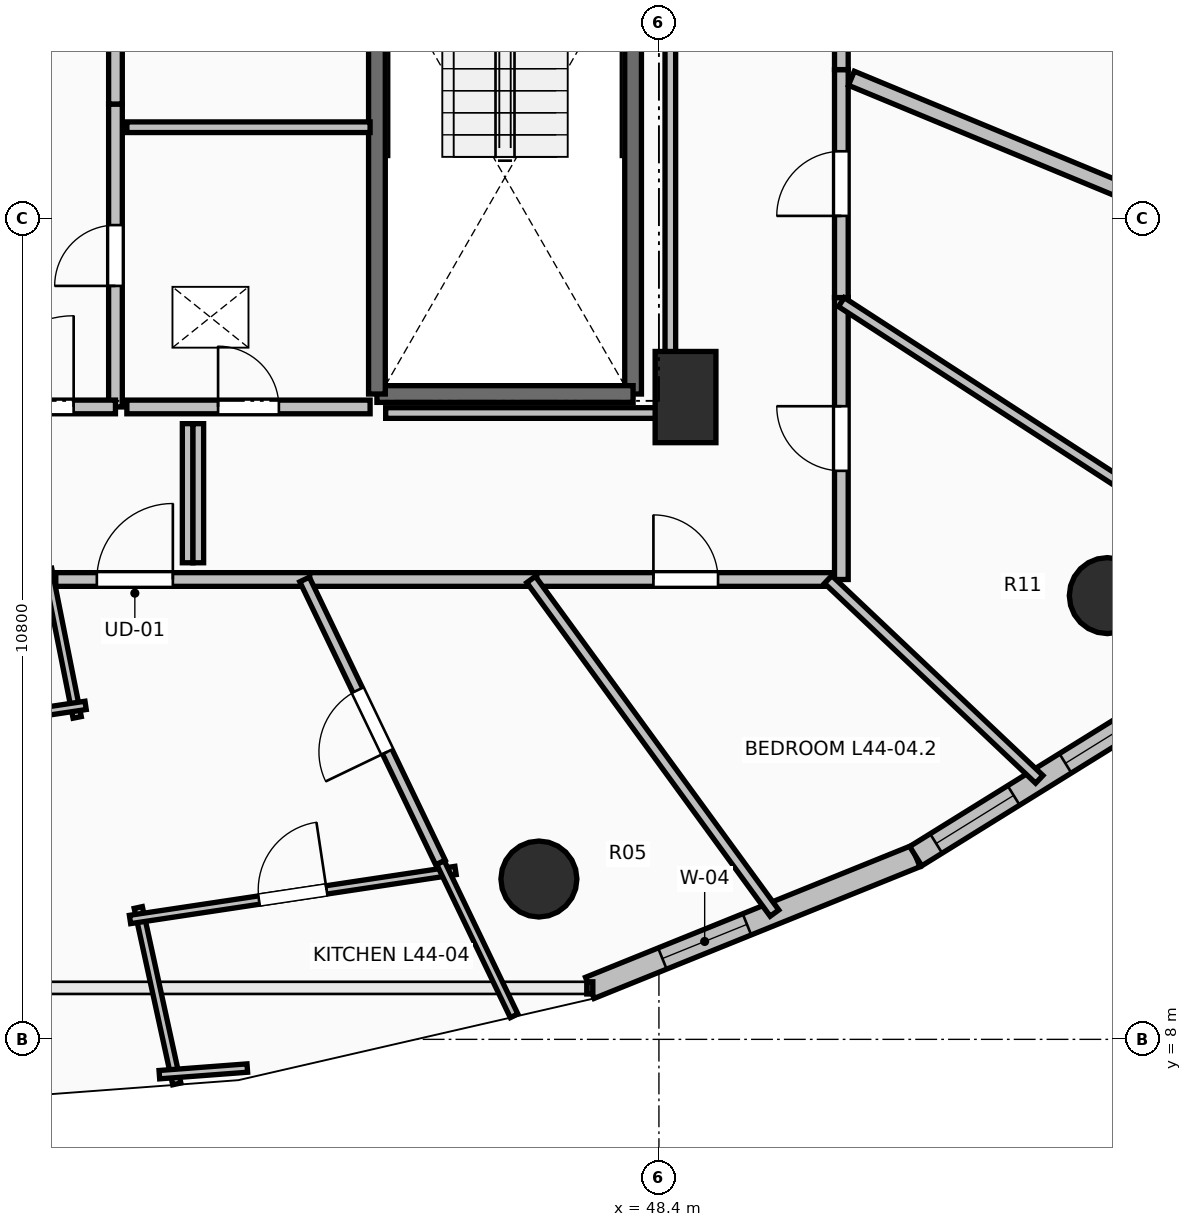
"""IFC4 building model, lengths in metres.
Left out: names, types, materials, properties, quantities, classifications, styles, units other than length and angle.
Written with IfcOpenShell. Run it as: python <this file> out.ifc"""

import sys

from ifc_helpers import new_model, si_unit, direction, frame, frame_2d, origin, origin_2d, place, context, subcontext, project, spatial, rectangle, circle, extrude, element, fill, save


model = new_model("IFC4")
c1 = context("Model", 3, precision=1e-05, world=origin(), true_north=direction((0.0, 1.0)))
c2 = subcontext(c1, "Body", "Model", "MODEL_VIEW")
j1 = project(units=[si_unit("LENGTHUNIT", "METRE"), si_unit("PLANEANGLEUNIT", "RADIAN")], contexts=[c1])
p1 = place(None, origin())
s1 = spatial("IfcSite", under=j1, at=p1, CompositionType="ELEMENT")
p2 = place(p1, origin())
s2 = spatial("IfcBuilding", under=s1, at=p2, CompositionType="ELEMENT")
p3 = place(p2, frame((0.0, 0.0, 164.1)))
s3 = spatial("IfcBuildingStorey", under=s2, at=p3, CompositionType="ELEMENT", Elevation=164.1)
for number, where, z_axis, x_axis in (
    (1, (46.821, 10.109, 0.0), (0.0, 0.0, 1.0), (0.383, -0.924, 0.0)),
    (2, (54.299, 13.838, 0.0), (0.0, 0.0, 1.0), (0.707, -0.707, 0.0)),
):
    element("IfcColumn", number, at=place(p3, frame(where, z_axis=z_axis, x_axis=x_axis)), inside=s3, PredefinedType="COLUMN", context=c2, shape_type="SweptSolid", body=[
        extrude(circle(Radius=0.5, at=origin_2d()), origin(), (0.0, 0.0, 1.0), 3.5),
    ])
p4 = place(p3, frame((48.75, 16.45, 0.0), z_axis=(0.0, 0.0, 1.0), x_axis=(1.0, 0.0, 0.0)))
e3 = element("IfcColumn", 3, at=p4, inside=s3, PredefinedType="PILASTER", context=c2, shape_type="SweptSolid", body=[
    extrude(rectangle(XDim=0.8, YDim=1.2, at=origin_2d()), origin(), (0.0, 0.0, 1.0), 3.5),
])
p5 = place(p3, frame((47.49, 8.677, 0.0), z_axis=(0.0, 0.0, 1.0), x_axis=(0.927156504392, 0.374674280359, 0.0)))
e4 = element("IfcWall", 4, at=p5, inside=s3, PredefinedType="STANDARD", context=c2, shape_type="SweptSolid", body=[
    extrude(rectangle(XDim=4.625, YDim=0.3, at=frame_2d((2.312, 0.0))), origin(), (0.0, 0.0, 1.0), 3.24),
])
p6 = place(p5, frame((1.03, 0.0, 0.85)))
e5 = element("IfcOpeningElement", 5, at=p6, cuts=e4, PredefinedType="OPENING", context=c2, shape_type="SweptSolid", body=[
    extrude(rectangle(XDim=1.2, YDim=1.95, at=frame_2d((0.6, 0.975))), frame((0.0, 0.165, 0.0), z_axis=(0.0, -1.0, 0.0), x_axis=(1.0, 0.0, 0.0)), (0.0, 0.0, 1.0), 0.33),
])
p7 = place(p3, frame((51.778, 10.41, 0.0), z_axis=(0.0, 0.0, 1.0), x_axis=(0.849721181976, 0.527232313977, 0.0)))
e6 = element("IfcWall", 6, at=p7, inside=s3, PredefinedType="STANDARD", context=c2, shape_type="SweptSolid", body=[
    extrude(rectangle(XDim=4.423, YDim=0.3, at=frame_2d((2.211, 0.0))), origin(), (0.0, 0.0, 1.0), 3.24),
])
p8 = place(p7, frame((0.317, 0.0, 0.85)))
e7 = element("IfcOpeningElement", 7, at=p8, cuts=e6, PredefinedType="OPENING", context=c2, shape_type="SweptSolid", body=[
    extrude(rectangle(XDim=1.2, YDim=1.95, at=frame_2d((0.6, 0.975))), frame((0.0, 0.165, 0.0), z_axis=(0.0, -1.0, 0.0), x_axis=(1.0, 0.0, 0.0)), (0.0, 0.0, 1.0), 0.33),
])
p9 = place(p7, frame((2.318, 0.0, 0.85)))
e8 = element("IfcOpeningElement", 8, at=p9, cuts=e6, PredefinedType="OPENING", context=c2, shape_type="SweptSolid", body=[
    extrude(rectangle(XDim=1.2, YDim=1.95, at=frame_2d((0.6, 0.975))), frame((0.0, 0.165, 0.0), z_axis=(0.0, -1.0, 0.0), x_axis=(1.0, 0.0, 0.0)), (0.0, 0.0, 1.0), 0.33),
])
p10 = place(p3, frame((48.06, 23.91, 0.0), z_axis=(0.0, 0.0, 1.0), x_axis=(0.0, -1.0, 0.0)))
e9 = element("IfcWall", 9, at=p10, inside=s3, PredefinedType="SOLIDWALL", context=c2, shape_type="SweptSolid", body=[
    extrude(rectangle(XDim=7.42, YDim=0.22, at=frame_2d((3.71, 0.0))), origin(), (0.0, 0.0, 1.0), 3.24),
])
p11 = place(p3, frame((48.06, 16.49, 0.0), z_axis=(0.0, 0.0, 1.0), x_axis=(-1.0, 0.0, 0.0)))
e10 = element("IfcWall", 10, at=p11, inside=s3, PredefinedType="SOLIDWALL", context=c2, shape_type="SweptSolid", body=[
    extrude(rectangle(XDim=3.37, YDim=0.22, at=frame_2d((1.685, 0.0))), origin(), (0.0, 0.0, 1.0), 3.24),
])
p12 = place(p3, frame((44.69, 16.49, 0.0), z_axis=(0.0, 0.0, 1.0), x_axis=(0.0, 1.0, 0.0)))
e11 = element("IfcWall", 11, at=p12, inside=s3, PredefinedType="SOLIDWALL", context=c2, shape_type="SweptSolid", body=[
    extrude(rectangle(XDim=7.42, YDim=0.22, at=frame_2d((3.71, 0.0))), origin(), (0.0, 0.0, 1.0), 3.24),
])
p13 = place(p3, frame((41.25, 16.32, 0.0), z_axis=(0.0, 0.0, 1.0), x_axis=(0.0, 1.0, 0.0)))
e12 = element("IfcWall", 12, at=p13, inside=s3, PredefinedType="PARTITIONING", context=c2, shape_type="SweptSolid", body=[
    extrude(rectangle(XDim=3.985, YDim=0.18, at=frame_2d((1.992, 0.0))), origin(), (0.0, 0.0, 1.0), 3.24),
])
p14 = place(p13, frame((1.593, 0.0, 0.0)))
e13 = element("IfcOpeningElement", 13, at=p14, cuts=e12, PredefinedType="OPENING", context=c2, shape_type="SweptSolid", body=[
    extrude(rectangle(XDim=0.8, YDim=2.05, at=frame_2d((0.4, 1.025))), frame((0.0, 0.105, 0.0), z_axis=(0.0, -1.0, 0.0), x_axis=(1.0, 0.0, 0.0)), (0.0, 0.0, 1.0), 0.21),
])
p15 = place(p3, frame((41.25, 20.305, 0.0), z_axis=(0.0, 0.0, 1.0), x_axis=(0.0, 1.0, 0.0)))
e14 = element("IfcWall", 14, at=p15, inside=s3, PredefinedType="PARTITIONING", context=c2, shape_type="SweptSolid", body=[
    extrude(rectangle(XDim=3.895, YDim=0.18, at=frame_2d((1.948, 0.0))), origin(), (0.0, 0.0, 1.0), 3.24),
])
p16 = place(p15, frame((1.522, 0.0, 0.0)))
e15 = element("IfcOpeningElement", 15, at=p16, cuts=e14, PredefinedType="OPENING", context=c2, shape_type="SweptSolid", body=[
    extrude(rectangle(XDim=0.85, YDim=2.1, at=frame_2d((0.425, 1.05))), frame((0.0, 0.105, 0.0), z_axis=(0.0, -1.0, 0.0), x_axis=(1.0, 0.0, 0.0)), (0.0, 0.0, 1.0), 0.21),
])
p17 = place(p3, frame((38.95, 16.32, 0.0), z_axis=(0.0, 0.0, 1.0), x_axis=(1.0, 0.0, 0.0)))
e16 = element("IfcWall", 16, at=p17, inside=s3, PredefinedType="PARTITIONING", context=c2, shape_type="SweptSolid", body=[
    extrude(rectangle(XDim=2.3, YDim=0.18, at=frame_2d((1.15, 0.0))), origin(), (0.0, 0.0, 1.0), 3.24),
])
p18 = place(p17, frame((0.55, 0.0, 0.0)))
e17 = element("IfcOpeningElement", 17, at=p18, cuts=e16, PredefinedType="OPENING", context=c2, shape_type="SweptSolid", body=[
    extrude(rectangle(XDim=1.2, YDim=2.15, at=frame_2d((0.6, 1.075))), frame((0.0, 0.105, 0.0), z_axis=(0.0, -1.0, 0.0), x_axis=(1.0, 0.0, 0.0)), (0.0, 0.0, 1.0), 0.21),
])
p19 = place(p3, frame((44.6, 20.0, 0.0), z_axis=(0.0, 0.0, 1.0), x_axis=(-1.0, 0.0, 0.0)))
e18 = element("IfcWall", 18, at=p19, inside=s3, PredefinedType="PARTITIONING", context=c2, shape_type="SweptSolid", body=[
    extrude(rectangle(XDim=3.2, YDim=0.14, at=frame_2d((1.6, 0.0))), origin(), (0.0, 0.0, 1.0), 3.24),
])
p20 = place(p3, frame((41.4, 16.32, 0.0), z_axis=(0.0, 0.0, 1.0), x_axis=(1.0, 0.0, 0.0)))
e19 = element("IfcWall", 19, at=p20, inside=s3, PredefinedType="PARTITIONING", context=c2, shape_type="SweptSolid", body=[
    extrude(rectangle(XDim=3.2, YDim=0.18, at=frame_2d((1.6, 0.0))), origin(), (0.0, 0.0, 1.0), 3.24),
])
p21 = place(p20, frame((1.2, 0.0, 0.0)))
e20 = element("IfcOpeningElement", 20, at=p21, cuts=e19, PredefinedType="OPENING", context=c2, shape_type="SweptSolid", body=[
    extrude(rectangle(XDim=0.8, YDim=2.05, at=frame_2d((0.4, 1.025))), frame((0.0, 0.105, 0.0), z_axis=(0.0, -1.0, 0.0), x_axis=(1.0, 0.0, 0.0)), (0.0, 0.0, 1.0), 0.21),
])
p22 = place(p3, frame((40.325, 14.05, 0.0), z_axis=(0.0, 0.0, 1.0), x_axis=(1.0, 0.0, 0.0)))
e21 = element("IfcWall", 21, at=p22, inside=s3, PredefinedType="PARTITIONING", context=c2, shape_type="SweptSolid", body=[
    extrude(rectangle(XDim=3.48, YDim=0.18, at=frame_2d((1.74, 0.0))), origin(), (0.0, 0.0, 1.0), 3.24),
])
p23 = place(p22, frame((0.68, 0.0, 0.0)))
e22 = element("IfcOpeningElement", 22, at=p23, cuts=e21, PredefinedType="OPENING", context=c2, shape_type="SweptSolid", body=[
    extrude(rectangle(XDim=1.0, YDim=2.15, at=frame_2d((0.5, 1.075))), frame((0.0, 0.105, 0.0), z_axis=(0.0, -1.0, 0.0), x_axis=(1.0, 0.0, 0.0)), (0.0, 0.0, 1.0), 0.21),
])
p24 = place(p3, frame((37.92, 14.05, 0.0), z_axis=(0.0, 0.0, 1.0), x_axis=(1.0, 0.0, 0.0)))
e23 = element("IfcWall", 23, at=p24, inside=s3, PredefinedType="PARTITIONING", context=c2, shape_type="SweptSolid", body=[
    extrude(rectangle(XDim=2.545, YDim=0.18, at=frame_2d((1.272, 0.0))), origin(), (0.0, 0.0, 1.0), 2.929),
])
p25 = place(p3, frame((43.805, 14.05, 0.0), z_axis=(0.0, 0.0, 1.0), x_axis=(1.0, 0.0, 0.0)))
e24 = element("IfcWall", 24, at=p25, inside=s3, PredefinedType="PARTITIONING", context=c2, shape_type="SweptSolid", body=[
    extrude(rectangle(XDim=2.987, YDim=0.18, at=frame_2d((1.494, 0.0))), origin(), (0.0, 0.0, 1.0), 2.432),
])
p26 = place(p3, frame((46.792, 14.05, 0.0), z_axis=(0.0, 0.0, 1.0), x_axis=(1.0, 0.0, 0.0)))
e25 = element("IfcWall", 25, at=p26, inside=s3, PredefinedType="PARTITIONING", context=c2, shape_type="SweptSolid", body=[
    extrude(rectangle(XDim=3.921, YDim=0.18, at=frame_2d((1.96, 0.0))), origin(), (0.0, 0.0, 1.0), 2.432),
])
p27 = place(p26, frame((1.535, 0.0, 0.0)))
e26 = element("IfcOpeningElement", 26, at=p27, cuts=e25, PredefinedType="OPENING", context=c2, shape_type="SweptSolid", body=[
    extrude(rectangle(XDim=0.85, YDim=2.1, at=frame_2d((0.425, 1.05))), frame((0.0, 0.105, 0.0), z_axis=(0.0, -1.0, 0.0), x_axis=(1.0, 0.0, 0.0)), (0.0, 0.0, 1.0), 0.21),
])
p28 = place(p3, frame((50.8, 14.05, 0.0), z_axis=(0.0, 0.0, 1.0), x_axis=(0.0, 1.0, 0.0)))
e27 = element("IfcWall", 27, at=p28, inside=s3, PredefinedType="PARTITIONING", context=c2, shape_type="SweptSolid", body=[
    extrude(rectangle(XDim=3.709, YDim=0.18, at=frame_2d((1.854, 0.0))), origin(), (0.0, 0.0, 1.0), 2.432),
])
p29 = place(p28, frame((1.429, 0.0, 0.0)))
e28 = element("IfcOpeningElement", 28, at=p29, cuts=e27, PredefinedType="OPENING", context=c2, shape_type="SweptSolid", body=[
    extrude(rectangle(XDim=0.85, YDim=2.1, at=frame_2d((0.425, 1.05))), frame((0.0, 0.105, 0.0), z_axis=(0.0, -1.0, 0.0), x_axis=(1.0, 0.0, 0.0)), (0.0, 0.0, 1.0), 0.21),
])
p30 = place(p3, frame((50.8, 17.759, 0.0), z_axis=(0.0, 0.0, 1.0), x_axis=(0.0, 1.0, 0.0)))
e29 = element("IfcWall", 29, at=p30, inside=s3, PredefinedType="PARTITIONING", context=c2, shape_type="SweptSolid", body=[
    extrude(rectangle(XDim=2.999, YDim=0.18, at=frame_2d((1.5, 0.0))), origin(), (0.0, 0.0, 1.0), 3.24),
])
p31 = place(p30, frame((1.074, 0.0, 0.0)))
e30 = element("IfcOpeningElement", 30, at=p31, cuts=e29, PredefinedType="OPENING", context=c2, shape_type="SweptSolid", body=[
    extrude(rectangle(XDim=0.85, YDim=2.1, at=frame_2d((0.425, 1.05))), frame((0.0, 0.105, 0.0), z_axis=(0.0, -1.0, 0.0), x_axis=(1.0, 0.0, 0.0)), (0.0, 0.0, 1.0), 0.21),
])
p32 = place(p3, frame((50.8, 20.758, 0.0), z_axis=(0.0, 0.0, 1.0), x_axis=(0.0, 1.0, 0.0)))
e31 = element("IfcWall", 31, at=p32, inside=s3, PredefinedType="PARTITIONING", context=c2, shape_type="SweptSolid", body=[
    extrude(rectangle(XDim=3.792, YDim=0.18, at=frame_2d((1.896, 0.0))), origin(), (0.0, 0.0, 1.0), 3.24),
])
p33 = place(p3, frame((40.358, 14.187, 0.0), z_axis=(0.0, 0.0, 1.0), x_axis=(0.195313900905, -0.980740781304, 0.0)))
e32 = element("IfcWall", 32, at=p33, inside=s3, PredefinedType="PARTITIONING", context=c2, shape_type="SweptSolid", body=[
    extrude(rectangle(XDim=1.99, YDim=0.11, at=frame_2d((0.995, 0.0))), origin(), (0.0, 0.0, 1.0), 2.929),
])
p34 = place(p3, frame((40.857, 12.394, 0.0), z_axis=(0.0, 0.0, 1.0), x_axis=(-0.988873015636, -0.148762088409, 0.0)))
e33 = element("IfcWall", 33, at=p34, inside=s3, PredefinedType="PARTITIONING", context=c2, shape_type="SweptSolid", body=[
    extrude(rectangle(XDim=3.03, YDim=0.11, at=frame_2d((1.515, 0.0))), origin(), (0.0, 0.0, 1.0), 3.24),
])
p35 = place(p34, frame((1.09, 0.0, 0.0)))
e34 = element("IfcOpeningElement", 34, at=p35, cuts=e33, PredefinedType="OPENING", context=c2, shape_type="SweptSolid", body=[
    extrude(rectangle(XDim=0.85, YDim=2.1, at=frame_2d((0.425, 1.05))), frame((0.0, 0.07, 0.0), z_axis=(0.0, -1.0, 0.0), x_axis=(1.0, 0.0, 0.0)), (0.0, 0.0, 1.0), 0.14),
])
p36 = place(p3, frame((42.057, 7.414, 0.0), z_axis=(0.0, 0.0, 1.0), x_axis=(-0.213381137421, 0.976969032361, 0.0)))
e35 = element("IfcWall", 35, at=p36, inside=s3, PredefinedType="PARTITIONING", context=c2, shape_type="SweptSolid", body=[
    extrude(rectangle(XDim=2.375, YDim=0.11, at=frame_2d((1.188, 0.0))), origin(), (0.0, 0.0, 1.0), 2.728),
])
p37 = place(p3, frame((41.442, 9.577, 0.0), z_axis=(0.0, 0.0, 1.0), x_axis=(0.988864290865, 0.148820073417, 0.0)))
e36 = element("IfcWall", 36, at=p37, inside=s3, PredefinedType="PARTITIONING", context=c2, shape_type="SweptSolid", body=[
    extrude(rectangle(XDim=4.331, YDim=0.11, at=frame_2d((2.166, 0.0))), origin(), (0.0, 0.0, 1.0), 3.24),
])
p38 = place(p37, frame((1.716, 0.0, 0.0)))
e37 = element("IfcOpeningElement", 37, at=p38, cuts=e36, PredefinedType="OPENING", context=c2, shape_type="SweptSolid", body=[
    extrude(rectangle(XDim=0.9, YDim=2.1, at=frame_2d((0.45, 1.05))), frame((0.0, 0.07, 0.0), z_axis=(0.0, -1.0, 0.0), x_axis=(1.0, 0.0, 0.0)), (0.0, 0.0, 1.0), 0.14),
])
p39 = place(p3, frame((45.525, 10.327, 0.0), z_axis=(0.0, 0.0, 1.0), x_axis=(0.433064390328, -0.901362986721, 0.0)))
e38 = element("IfcWall", 38, at=p39, inside=s3, PredefinedType="PARTITIONING", context=c2, shape_type="SweptSolid", body=[
    extrude(rectangle(XDim=2.238, YDim=0.11, at=frame_2d((1.119, 0.0))), origin(), (0.0, 0.0, 1.0), 2.728),
])
p40 = place(p3, frame((41.827, 7.535, 0.0), z_axis=(0.0, 0.0, 1.0), x_axis=(0.997175725754, 0.07510374137, 0.0)))
e39 = element("IfcWall", 39, at=p40, inside=s3, PredefinedType="PARTITIONING", context=c2, shape_type="SweptSolid", body=[
    extrude(rectangle(XDim=1.16, YDim=0.11, at=frame_2d((0.58, 0.0))), origin(), (0.0, 0.0, 1.0), 3.24),
])
p41 = place(p3, frame((45.526, 10.327, 0.0), z_axis=(0.0, 0.0, 1.0), x_axis=(-0.432873287366, 0.90145477817, 0.0)))
e40 = element("IfcWall", 40, at=p41, inside=s3, PredefinedType="PARTITIONING", context=c2, shape_type="SweptSolid", body=[
    extrude(rectangle(XDim=4.13, YDim=0.14, at=frame_2d((2.065, 0.0))), origin(), (0.0, 0.0, 1.0), 2.432),
])
p42 = place(p41, frame((1.615, 0.0, 0.0)))
e41 = element("IfcOpeningElement", 41, at=p42, cuts=e40, PredefinedType="OPENING", context=c2, shape_type="SweptSolid", body=[
    extrude(rectangle(XDim=0.9, YDim=2.1, at=frame_2d((0.45, 1.05))), frame((0.0, 0.085, 0.0), z_axis=(0.0, -1.0, 0.0), x_axis=(1.0, 0.0, 0.0)), (0.0, 0.0, 1.0), 0.17),
])
p43 = place(p3, frame((49.92, 9.661, 0.0), z_axis=(0.0, 0.0, 1.0), x_axis=(-0.589349395673, 0.807878264233, 0.0)))
e42 = element("IfcWall", 42, at=p43, inside=s3, PredefinedType="PARTITIONING", context=c2, shape_type="SweptSolid", body=[
    extrude(rectangle(XDim=5.433, YDim=0.14, at=frame_2d((2.716, 0.0))), origin(), (0.0, 0.0, 1.0), 2.432),
])
p44 = place(p3, frame((53.404, 11.421, 0.0), z_axis=(0.0, 0.0, 1.0), x_axis=(-0.726306487509, 0.687370996044, 0.0)))
e43 = element("IfcWall", 43, at=p44, inside=s3, PredefinedType="PARTITIONING", context=c2, shape_type="SweptSolid", body=[
    extrude(rectangle(XDim=3.825, YDim=0.14, at=frame_2d((1.913, 0.0))), origin(), (0.0, 0.0, 1.0), 2.728),
])
p45 = place(p3, frame((56.736, 13.85, 0.0), z_axis=(0.0, 0.0, 1.0), x_axis=(-0.839059638195, 0.544039450364, 0.0)))
e44 = element("IfcWall", 44, at=p45, inside=s3, PredefinedType="PARTITIONING", context=c2, shape_type="SweptSolid", body=[
    extrude(rectangle(XDim=7.075, YDim=0.14, at=frame_2d((3.537, 0.0))), origin(), (0.0, 0.0, 1.0), 2.728),
])
p46 = place(p3, frame((55.623, 18.7, 0.0), z_axis=(0.0, 0.0, 1.0), x_axis=(-0.923813457571, 0.382842912446, 0.0)))
e45 = element("IfcWall", 45, at=p46, inside=s3, PredefinedType="PARTITIONING", context=c2, shape_type="SweptSolid", body=[
    extrude(rectangle(XDim=5.078, YDim=0.2, at=frame_2d((2.539, 0.0))), origin(), (0.0, 0.0, 1.0), 2.886),
])
p47 = place(p3, frame((48.55, 16.24, 0.0), z_axis=(0.0, 0.0, 1.0), x_axis=(0.0, 1.0, 0.0)))
e46 = element("IfcWall", 46, at=p47, inside=s3, PredefinedType="PARTITIONING", context=c2, shape_type="SweptSolid", body=[
    extrude(rectangle(XDim=7.514, YDim=0.14, at=frame_2d((3.757, 0.0))), origin(), (0.0, 0.0, 1.0), 2.432),
])
for number, where, z_axis, x_axis in (
    (47, (42.2, 16.1, 0.0), (0.0, 0.0, 1.0), (0.0, -1.0, 0.0)),
    (48, (42.34, 14.27, 0.0), (0.0, 0.0, 1.0), (0.0, 1.0, 0.0)),
):
    element("IfcWall", number, at=place(p3, frame(where, z_axis=z_axis, x_axis=x_axis)), inside=s3, PredefinedType="PARTITIONING", context=c2, shape_type="SweptSolid", body=[
        extrude(rectangle(XDim=1.83, YDim=0.14, at=frame_2d((0.915, 0.0))), origin(), (0.0, 0.0, 1.0), 3.24),
    ])
p48 = place(p3, frame((44.805, 16.24, 0.0), z_axis=(0.0, 0.0, 1.0), x_axis=(1.0, 0.0, 0.0)))
e49 = element("IfcWall", 49, at=p48, inside=s3, PredefinedType="PARTITIONING", context=c2, shape_type="SweptSolid", body=[
    extrude(rectangle(XDim=3.745, YDim=0.14, at=frame_2d((1.873, 0.0))), origin(), (0.0, 0.0, 1.0), 2.432),
])
p49 = place(p6, origin())
e50 = element("IfcWindow", 50, at=p49, inside=s3, PartitioningType="SINGLE_PANEL", PredefinedType="WINDOW", context=c2, shape_type="SweptSolid", body=[
    extrude(rectangle(XDim=1.2, YDim=1.95, at=frame_2d((0.6, 0.975))), frame((0.0, 0.03, 0.0), z_axis=(0.0, -1.0, 0.0), x_axis=(1.0, 0.0, 0.0)), (0.0, 0.0, 1.0), 0.06),
])
fill(e5, e50)
p50 = place(p8, origin())
e51 = element("IfcWindow", 51, at=p50, inside=s3, PartitioningType="SINGLE_PANEL", PredefinedType="WINDOW", context=c2, shape_type="SweptSolid", body=[
    extrude(rectangle(XDim=1.2, YDim=1.95, at=frame_2d((0.6, 0.975))), frame((0.0, 0.03, 0.0), z_axis=(0.0, -1.0, 0.0), x_axis=(1.0, 0.0, 0.0)), (0.0, 0.0, 1.0), 0.06),
])
fill(e7, e51)
p51 = place(p9, origin())
e52 = element("IfcWindow", 52, at=p51, inside=s3, PartitioningType="SINGLE_PANEL", PredefinedType="WINDOW", context=c2, shape_type="SweptSolid", body=[
    extrude(rectangle(XDim=1.2, YDim=1.95, at=frame_2d((0.6, 0.975))), frame((0.0, 0.03, 0.0), z_axis=(0.0, -1.0, 0.0), x_axis=(1.0, 0.0, 0.0)), (0.0, 0.0, 1.0), 0.06),
])
fill(e8, e52)
p52 = place(p14, origin())
e53 = element("IfcDoor", 53, at=p52, inside=s3, OperationType="SINGLE_SWING_LEFT", PredefinedType="DOOR", context=c2, shape_type="SweptSolid", body=[
    extrude(rectangle(XDim=0.8, YDim=2.05, at=frame_2d((0.4, 1.025))), frame((0.0, 0.025, 0.0), z_axis=(0.0, -1.0, 0.0), x_axis=(1.0, 0.0, 0.0)), (0.0, 0.0, 1.0), 0.05),
])
fill(e13, e53)
p53 = place(p18, origin())
e54 = element("IfcDoor", 54, at=p53, inside=s3, OperationType="SINGLE_SWING_RIGHT", PredefinedType="DOOR", context=c2, shape_type="SweptSolid", body=[
    extrude(rectangle(XDim=1.2, YDim=2.15, at=frame_2d((0.6, 1.075))), frame((0.0, 0.025, 0.0), z_axis=(0.0, -1.0, 0.0), x_axis=(1.0, 0.0, 0.0)), (0.0, 0.0, 1.0), 0.05),
])
fill(e17, e54)
p54 = place(p21, origin())
e55 = element("IfcDoor", 55, at=p54, inside=s3, OperationType="SINGLE_SWING_LEFT", PredefinedType="DOOR", context=c2, shape_type="SweptSolid", body=[
    extrude(rectangle(XDim=0.8, YDim=2.05, at=frame_2d((0.4, 1.025))), frame((0.0, 0.025, 0.0), z_axis=(0.0, -1.0, 0.0), x_axis=(1.0, 0.0, 0.0)), (0.0, 0.0, 1.0), 0.05),
])
fill(e20, e55)
p55 = place(p23, origin())
e56 = element("IfcDoor", 56, at=p55, inside=s3, OperationType="SINGLE_SWING_RIGHT", PredefinedType="DOOR", context=c2, shape_type="SweptSolid", body=[
    extrude(rectangle(XDim=1.0, YDim=2.15, at=frame_2d((0.5, 1.075))), frame((0.0, 0.025, 0.0), z_axis=(0.0, -1.0, 0.0), x_axis=(1.0, 0.0, 0.0)), (0.0, 0.0, 1.0), 0.05),
])
fill(e22, e56)
p56 = place(p38, origin())
e57 = element("IfcDoor", 57, at=p56, inside=s3, OperationType="SINGLE_SWING_RIGHT", PredefinedType="DOOR", context=c2, shape_type="SweptSolid", body=[
    extrude(rectangle(XDim=0.9, YDim=2.1, at=frame_2d((0.45, 1.05))), frame((0.0, 0.025, 0.0), z_axis=(0.0, -1.0, 0.0), x_axis=(1.0, 0.0, 0.0)), (0.0, 0.0, 1.0), 0.05),
])
fill(e37, e57)
p57 = place(p42, origin())
e58 = element("IfcDoor", 58, at=p57, inside=s3, OperationType="SINGLE_SWING_LEFT", PredefinedType="DOOR", context=c2, shape_type="SweptSolid", body=[
    extrude(rectangle(XDim=0.9, YDim=2.1, at=frame_2d((0.45, 1.05))), frame((0.0, 0.025, 0.0), z_axis=(0.0, -1.0, 0.0), x_axis=(1.0, 0.0, 0.0)), (0.0, 0.0, 1.0), 0.05),
])
fill(e41, e58)
p58 = place(p27, origin())
e59 = element("IfcDoor", 59, at=p58, inside=s3, OperationType="SINGLE_SWING_LEFT", PredefinedType="DOOR", context=c2, shape_type="SweptSolid", body=[
    extrude(rectangle(XDim=0.85, YDim=2.1, at=frame_2d((0.425, 1.05))), frame((0.0, 0.025, 0.0), z_axis=(0.0, -1.0, 0.0), x_axis=(1.0, 0.0, 0.0)), (0.0, 0.0, 1.0), 0.05),
])
fill(e26, e59)
p59 = place(p29, origin())
e60 = element("IfcDoor", 60, at=p59, inside=s3, OperationType="SINGLE_SWING_RIGHT", PredefinedType="DOOR", context=c2, shape_type="SweptSolid", body=[
    extrude(rectangle(XDim=0.85, YDim=2.1, at=frame_2d((0.425, 1.05))), frame((0.0, 0.025, 0.0), z_axis=(0.0, -1.0, 0.0), x_axis=(1.0, 0.0, 0.0)), (0.0, 0.0, 1.0), 0.05),
])
fill(e28, e60)
p60 = place(p31, origin())
e61 = element("IfcDoor", 61, at=p60, inside=s3, OperationType="SINGLE_SWING_LEFT", PredefinedType="DOOR", context=c2, shape_type="SweptSolid", body=[
    extrude(rectangle(XDim=0.85, YDim=2.1, at=frame_2d((0.425, 1.05))), frame((0.0, 0.025, 0.0), z_axis=(0.0, -1.0, 0.0), x_axis=(1.0, 0.0, 0.0)), (0.0, 0.0, 1.0), 0.05),
])
fill(e30, e61)
save(model, sys.argv[1])
